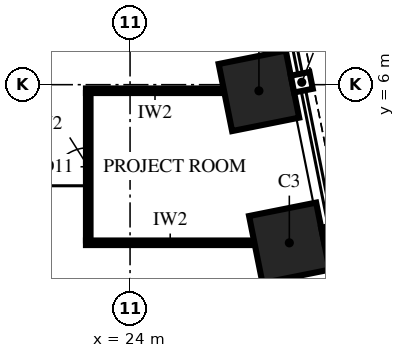
"""IFC4 building model, lengths in metres.
Left out: names, types, materials, properties, quantities, classifications, styles, units other than length and angle.
Written with IfcOpenShell. Run it as: python <this file> out.ifc"""

import sys

from ifc_helpers import new_model, si_unit, direction, frame, frame_2d, origin, origin_2d, place, context, subcontext, project, spatial, rectangle, extrude, element, fill, save


model = new_model("IFC4")
c1 = context("Model", 3, precision=1e-05, world=origin(), true_north=direction((0.0, 1.0)))
c2 = subcontext(c1, "Body", "Model", "MODEL_VIEW")
j1 = project(units=[si_unit("LENGTHUNIT", "METRE"), si_unit("PLANEANGLEUNIT", "RADIAN")], contexts=[c1])
p1 = place(None, origin())
s1 = spatial("IfcSite", under=j1, at=p1, CompositionType="ELEMENT")
p2 = place(p1, origin())
s2 = spatial("IfcBuilding", under=s1, at=p2, CompositionType="ELEMENT")
p3 = place(p2, frame((0.0, 0.0, 103.0)))
s3 = spatial("IfcBuildingStorey", under=s2, at=p3, CompositionType="ELEMENT", Elevation=103.0)
for number, where, z_axis, x_axis in (
    (1, (28.191, 1.838, 0.0), (0.0, 0.0, 1.0), (-0.196, 0.981, 0.0)),
    (2, (27.391, 5.838, 0.0), (0.0, 0.0, 1.0), (-0.196, 0.981, 0.0)),
):
    element("IfcColumn", number, at=place(p3, frame(where, z_axis=z_axis, x_axis=x_axis)), inside=s3, PredefinedType="COLUMN", context=c2, shape_type="SweptSolid", body=[
        extrude(rectangle(XDim=1.8, YDim=1.8, at=origin_2d()), origin(), (0.0, 0.0, 1.0), 4.0),
    ])
p4 = place(p3, frame((22.84, 1.84, 0.0), z_axis=(0.0, 0.0, 1.0), x_axis=(1.0, 0.0, 0.0)))
e3 = element("IfcWall", 3, at=p4, inside=s3, PredefinedType="PARTITIONING", context=c2, shape_type="SweptSolid", body=[
    extrude(rectangle(XDim=4.433, YDim=0.12, at=frame_2d((2.216, 0.0))), origin(), (0.0, 0.0, 1.0), 3.25),
])
p5 = place(p3, frame((22.84, 5.84, 0.0), z_axis=(0.0, 0.0, 1.0), x_axis=(1.0, 0.0, 0.0)))
e4 = element("IfcWall", 4, at=p5, inside=s3, PredefinedType="PARTITIONING", context=c2, shape_type="SweptSolid", body=[
    extrude(rectangle(XDim=3.633, YDim=0.12, at=frame_2d((1.816, 0.0))), origin(), (0.0, 0.0, 1.0), 2.842),
])
p6 = place(p3, frame((22.9, 1.9, 0.0), z_axis=(0.0, 0.0, 1.0), x_axis=(0.0, 1.0, 0.0)))
e5 = element("IfcWall", 5, at=p6, inside=s3, PredefinedType="PARTITIONING", context=c2, shape_type="SweptSolid", body=[
    extrude(rectangle(XDim=3.88, YDim=0.12, at=frame_2d((1.94, 0.0))), origin(), (0.0, 0.0, 1.0), 3.85),
])
p7 = place(p6, frame((1.44, 0.0, 0.0)))
e6 = element("IfcOpeningElement", 6, at=p7, cuts=e5, PredefinedType="OPENING", context=c2, shape_type="SweptSolid", body=[
    extrude(rectangle(XDim=1.0, YDim=2.4, at=frame_2d((0.5, 1.2))), frame((0.0, 0.075, 0.0), z_axis=(0.0, -1.0, 0.0), x_axis=(1.0, 0.0, 0.0)), (0.0, 0.0, 1.0), 0.15),
])
p8 = place(p7, origin())
e7 = element("IfcDoor", 7, at=p8, inside=s3, OperationType="SINGLE_SWING_RIGHT", PredefinedType="DOOR", context=c2, shape_type="SweptSolid", body=[
    extrude(rectangle(XDim=1.0, YDim=2.4, at=frame_2d((0.5, 1.2))), frame((0.0, 0.06, 0.0), z_axis=(0.0, -1.0, 0.0), x_axis=(1.0, 0.0, 0.0)), (0.0, 0.0, 1.0), 0.12),
])
fill(e6, e7)
save(model, sys.argv[1])
